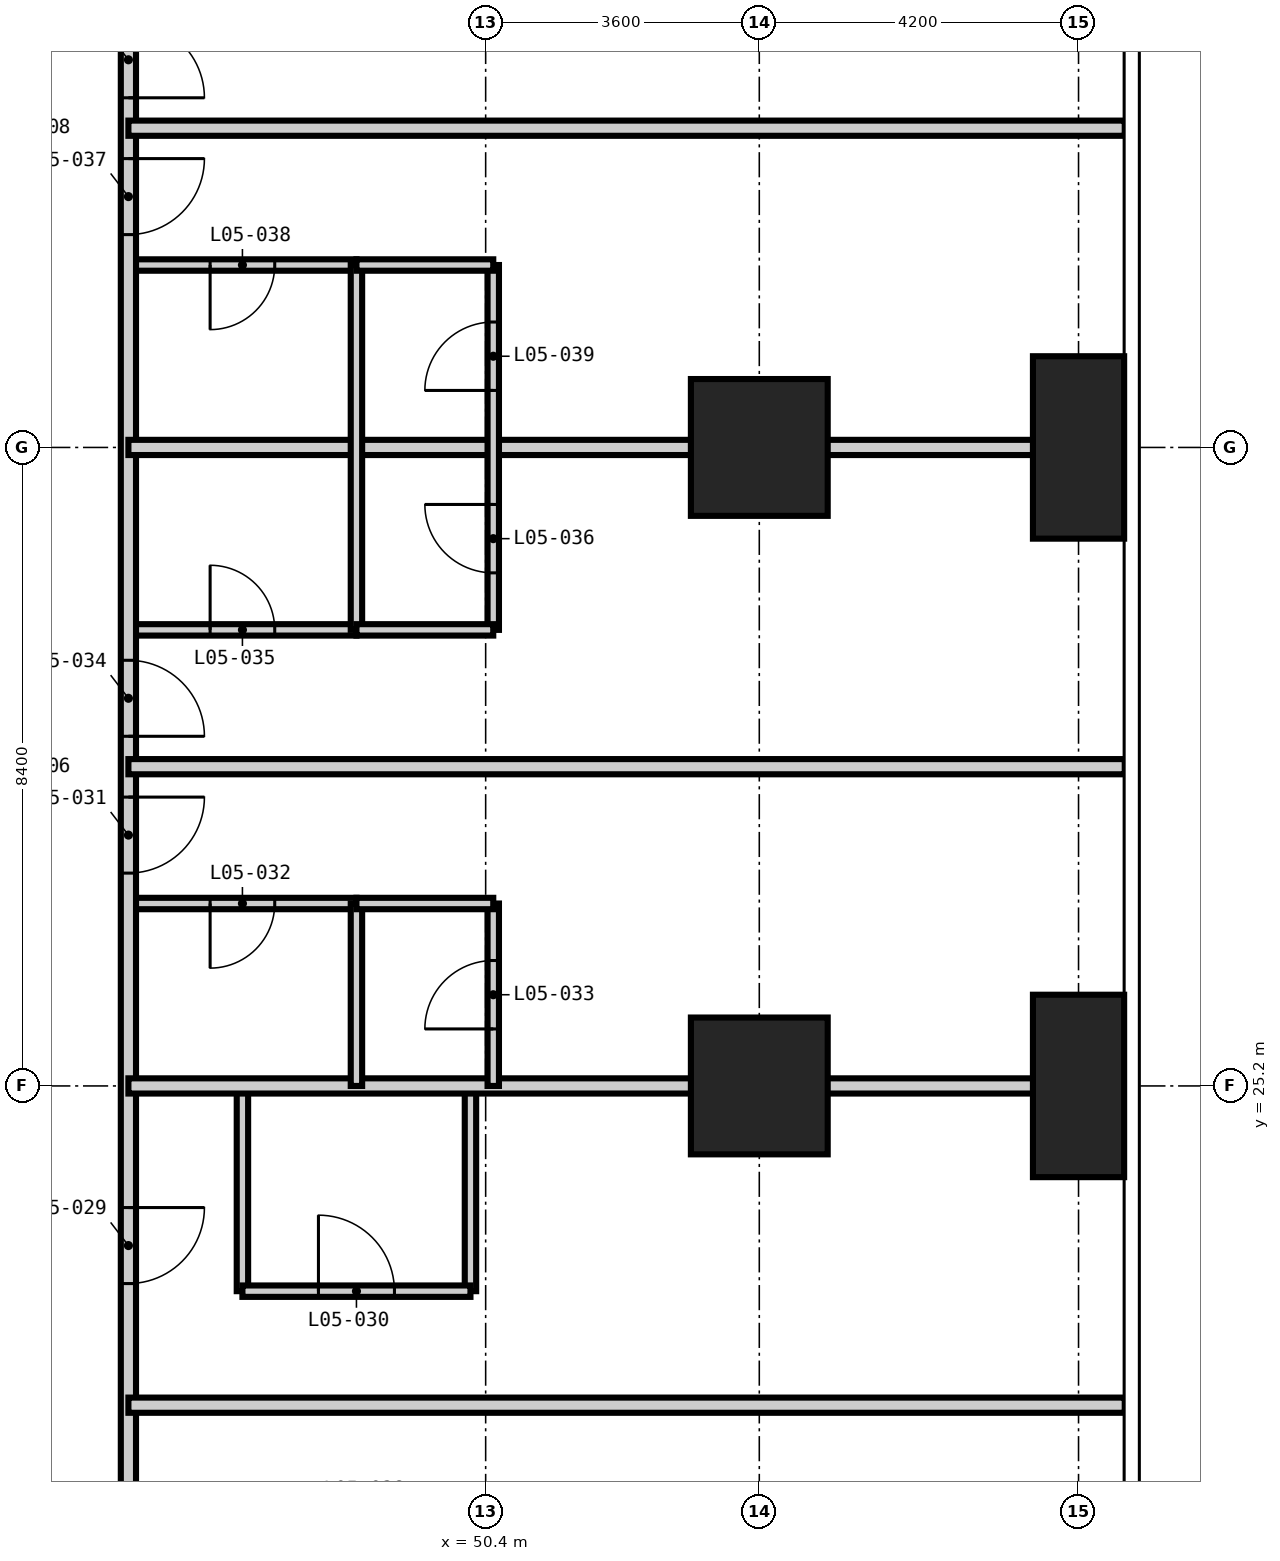
"""IFC4 building model, lengths in metres.
Left out: names, types, materials, properties, quantities, classifications, styles, units other than length and angle.
Written with IfcOpenShell. Run it as: python <this file> out.ifc"""

import sys

from ifc_helpers import new_model, si_unit, direction, frame, frame_2d, origin, origin_2d, place, context, subcontext, project, spatial, rectangle, extrude, element, fill, save


model = new_model("IFC4")
c1 = context("Model", 3, precision=1e-05, world=origin(), true_north=direction((0.0, 1.0)))
c2 = subcontext(c1, "Body", "Model", "MODEL_VIEW")
j1 = project(units=[si_unit("LENGTHUNIT", "METRE"), si_unit("PLANEANGLEUNIT", "RADIAN")], contexts=[c1])
p1 = place(None, origin())
s1 = spatial("IfcSite", under=j1, at=p1, CompositionType="ELEMENT")
p2 = place(p1, origin())
s2 = spatial("IfcBuilding", under=s1, at=p2, CompositionType="ELEMENT")
p3 = place(p2, frame((0.0, 0.0, 27.0)))
s3 = spatial("IfcBuildingStorey", under=s2, at=p3, CompositionType="ELEMENT", Elevation=27.0)
for number, where, z_axis, x_axis in (
    (1, (54.0, 25.2, -0.35), (0.0, 0.0, 1.0), (1.0, 0.0, 0.0)),
    (2, (54.0, 33.6, -0.35), (0.0, 0.0, 1.0), (1.0, 0.0, 0.0)),
):
    element("IfcColumn", number, at=place(p3, frame(where, z_axis=z_axis, x_axis=x_axis)), inside=s3, PredefinedType="COLUMN", context=c2, shape_type="SweptSolid", body=[
        extrude(rectangle(XDim=1.8, YDim=1.8, at=origin_2d()), origin(), (0.0, 0.0, 1.0), 3.6),
    ])
for number, where, z_axis, x_axis in (
    (3, (58.2, 25.2, -0.35), (0.0, 0.0, 1.0), (1.0, 0.0, 0.0)),
    (4, (58.2, 33.6, -0.35), (0.0, 0.0, 1.0), (1.0, 0.0, 0.0)),
):
    element("IfcColumn", number, at=place(p3, frame(where, z_axis=z_axis, x_axis=x_axis)), inside=s3, PredefinedType="COLUMN", context=c2, shape_type="SweptSolid", body=[
        extrude(rectangle(XDim=1.2, YDim=2.4, at=origin_2d()), origin(), (0.0, 0.0, 1.0), 3.6),
    ])
for number, where, z_axis, x_axis in (
    (5, (47.2, 22.5, 0.0), (0.0, 0.0, 1.0), (0.0, 1.0, 0.0)),
    (6, (50.2, 22.5, 0.0), (0.0, 0.0, 1.0), (0.0, 1.0, 0.0)),
):
    element("IfcWall", number, at=place(p3, frame(where, z_axis=z_axis, x_axis=x_axis)), inside=s3, PredefinedType="PARTITIONING", context=c2, shape_type="SweptSolid", body=[
        extrude(rectangle(XDim=2.7, YDim=0.15, at=frame_2d((1.35, 0.0))), origin(), (0.0, 0.0, 1.0), 3.25),
    ])
p4 = place(p3, frame((47.2, 22.5, 0.0), z_axis=(0.0, 0.0, 1.0), x_axis=(1.0, 0.0, 0.0)))
e7 = element("IfcWall", 7, at=p4, inside=s3, PredefinedType="PARTITIONING", context=c2, shape_type="SweptSolid", body=[
    extrude(rectangle(XDim=3.0, YDim=0.15, at=frame_2d((1.5, 0.0))), origin(), (0.0, 0.0, 1.0), 3.25),
])
p5 = place(p4, frame((1.0, 0.0, 0.0)))
e8 = element("IfcOpeningElement", 8, at=p5, cuts=e7, PredefinedType="OPENING", context=c2, shape_type="SweptSolid", body=[
    extrude(rectangle(XDim=1.0, YDim=2.1, at=frame_2d((0.5, 1.05))), frame((0.0, 0.085, 0.0), z_axis=(0.0, -1.0, 0.0), x_axis=(1.0, 0.0, 0.0)), (0.0, 0.0, 1.0), 0.17),
])
p6 = place(p3, frame((45.7, 27.6, 0.0), z_axis=(0.0, 0.0, 1.0), x_axis=(1.0, 0.0, 0.0)))
e9 = element("IfcWall", 9, at=p6, inside=s3, PredefinedType="PARTITIONING", context=c2, shape_type="SweptSolid", body=[
    extrude(rectangle(XDim=3.0, YDim=0.15, at=frame_2d((1.5, 0.0))), origin(), (0.0, 0.0, 1.0), 3.25),
])
p7 = place(p6, frame((1.075, 0.0, 0.0)))
e10 = element("IfcOpeningElement", 10, at=p7, cuts=e9, PredefinedType="OPENING", context=c2, shape_type="SweptSolid", body=[
    extrude(rectangle(XDim=0.85, YDim=2.1, at=frame_2d((0.425, 1.05))), frame((0.0, 0.085, 0.0), z_axis=(0.0, -1.0, 0.0), x_axis=(1.0, 0.0, 0.0)), (0.0, 0.0, 1.0), 0.17),
])
p8 = place(p3, frame((45.7, 31.2, 0.0), z_axis=(0.0, 0.0, 1.0), x_axis=(1.0, 0.0, 0.0)))
e11 = element("IfcWall", 11, at=p8, inside=s3, PredefinedType="PARTITIONING", context=c2, shape_type="SweptSolid", body=[
    extrude(rectangle(XDim=3.0, YDim=0.15, at=frame_2d((1.5, 0.0))), origin(), (0.0, 0.0, 1.0), 3.25),
])
p9 = place(p8, frame((1.075, 0.0, 0.0)))
e12 = element("IfcOpeningElement", 12, at=p9, cuts=e11, PredefinedType="OPENING", context=c2, shape_type="SweptSolid", body=[
    extrude(rectangle(XDim=0.85, YDim=2.1, at=frame_2d((0.425, 1.05))), frame((0.0, 0.085, 0.0), z_axis=(0.0, -1.0, 0.0), x_axis=(1.0, 0.0, 0.0)), (0.0, 0.0, 1.0), 0.17),
])
p10 = place(p3, frame((45.7, 36.0, 0.0), z_axis=(0.0, 0.0, 1.0), x_axis=(1.0, 0.0, 0.0)))
e13 = element("IfcWall", 13, at=p10, inside=s3, PredefinedType="PARTITIONING", context=c2, shape_type="SweptSolid", body=[
    extrude(rectangle(XDim=3.0, YDim=0.15, at=frame_2d((1.5, 0.0))), origin(), (0.0, 0.0, 1.0), 3.25),
])
p11 = place(p10, frame((1.075, 0.0, 0.0)))
e14 = element("IfcOpeningElement", 14, at=p11, cuts=e13, PredefinedType="OPENING", context=c2, shape_type="SweptSolid", body=[
    extrude(rectangle(XDim=0.85, YDim=2.1, at=frame_2d((0.425, 1.05))), frame((0.0, 0.085, 0.0), z_axis=(0.0, -1.0, 0.0), x_axis=(1.0, 0.0, 0.0)), (0.0, 0.0, 1.0), 0.17),
])
p12 = place(p3, frame((45.7, 46.0, 0.0), z_axis=(0.0, 0.0, 1.0), x_axis=(0.0, -1.0, 0.0)))
e15 = element("IfcWall", 15, at=p12, inside=s3, PredefinedType="PARTITIONING", context=c2, shape_type="SweptSolid", body=[
    extrude(rectangle(XDim=32.6, YDim=0.2, at=frame_2d((16.3, 0.0))), origin(), (0.0, 0.0, 1.0), 3.25),
])
p13 = place(p12, frame((26.6, 0.0, 0.0)))
e16 = element("IfcOpeningElement", 16, at=p13, cuts=e15, PredefinedType="OPENING", context=c2, shape_type="SweptSolid", body=[
    extrude(rectangle(XDim=1.0, YDim=2.2, at=frame_2d((0.5, 1.1))), frame((0.0, 0.11, 0.0), z_axis=(0.0, -1.0, 0.0), x_axis=(1.0, 0.0, 0.0)), (0.0, 0.0, 1.0), 0.22),
])
p14 = place(p12, frame((22.4, 0.0, 0.0)))
e17 = element("IfcOpeningElement", 17, at=p14, cuts=e15, PredefinedType="OPENING", context=c2, shape_type="SweptSolid", body=[
    extrude(rectangle(XDim=1.0, YDim=2.2, at=frame_2d((0.5, 1.1))), frame((0.0, 0.11, 0.0), z_axis=(0.0, -1.0, 0.0), x_axis=(1.0, 0.0, 0.0)), (0.0, 0.0, 1.0), 0.22),
])
p15 = place(p12, frame((17.0, 0.0, 0.0)))
e18 = element("IfcOpeningElement", 18, at=p15, cuts=e15, PredefinedType="OPENING", context=c2, shape_type="SweptSolid", body=[
    extrude(rectangle(XDim=1.0, YDim=2.2, at=frame_2d((0.5, 1.1))), frame((0.0, 0.11, 0.0), z_axis=(0.0, -1.0, 0.0), x_axis=(1.0, 0.0, 0.0)), (0.0, 0.0, 1.0), 0.22),
])
p16 = place(p12, frame((15.2, 0.0, 0.0)))
e19 = element("IfcOpeningElement", 19, at=p16, cuts=e15, PredefinedType="OPENING", context=c2, shape_type="SweptSolid", body=[
    extrude(rectangle(XDim=1.0, YDim=2.2, at=frame_2d((0.5, 1.1))), frame((0.0, 0.11, 0.0), z_axis=(0.0, -1.0, 0.0), x_axis=(1.0, 0.0, 0.0)), (0.0, 0.0, 1.0), 0.22),
])
p17 = place(p12, frame((8.6, 0.0, 0.0)))
e20 = element("IfcOpeningElement", 20, at=p17, cuts=e15, PredefinedType="OPENING", context=c2, shape_type="SweptSolid", body=[
    extrude(rectangle(XDim=1.0, YDim=2.2, at=frame_2d((0.5, 1.1))), frame((0.0, 0.11, 0.0), z_axis=(0.0, -1.0, 0.0), x_axis=(1.0, 0.0, 0.0)), (0.0, 0.0, 1.0), 0.22),
])
p18 = place(p12, frame((6.8, 0.0, 0.0)))
e21 = element("IfcOpeningElement", 21, at=p18, cuts=e15, PredefinedType="OPENING", context=c2, shape_type="SweptSolid", body=[
    extrude(rectangle(XDim=1.0, YDim=2.2, at=frame_2d((0.5, 1.1))), frame((0.0, 0.11, 0.0), z_axis=(0.0, -1.0, 0.0), x_axis=(1.0, 0.0, 0.0)), (0.0, 0.0, 1.0), 0.22),
])
p19 = place(p12, frame((30.4, 0.0, 0.0)))
e22 = element("IfcOpeningElement", 22, at=p19, cuts=e15, PredefinedType="OPENING", context=c2, shape_type="SweptSolid", body=[
    extrude(rectangle(XDim=1.0, YDim=2.2, at=frame_2d((0.5, 1.1))), frame((0.0, 0.11, 0.0), z_axis=(0.0, -1.0, 0.0), x_axis=(1.0, 0.0, 0.0)), (0.0, 0.0, 1.0), 0.22),
])
p20 = place(p12, frame((1.5, 0.0, 0.0)))
e23 = element("IfcOpeningElement", 23, at=p20, cuts=e15, PredefinedType="OPENING", context=c2, shape_type="SweptSolid", body=[
    extrude(rectangle(XDim=1.0, YDim=2.2, at=frame_2d((0.5, 1.1))), frame((0.0, 0.11, 0.0), z_axis=(0.0, -1.0, 0.0), x_axis=(1.0, 0.0, 0.0)), (0.0, 0.0, 1.0), 0.22),
])
for number, where, z_axis, x_axis in (
    (24, (45.7, 21.0, 0.0), (0.0, 0.0, 1.0), (1.0, 0.0, 0.0)),
    (25, (45.7, 25.2, 0.0), (0.0, 0.0, 1.0), (1.0, 0.0, 0.0)),
    (26, (45.7, 29.4, 0.0), (0.0, 0.0, 1.0), (1.0, 0.0, 0.0)),
    (27, (45.7, 33.6, 0.0), (0.0, 0.0, 1.0), (1.0, 0.0, 0.0)),
    (28, (45.7, 37.8, 0.0), (0.0, 0.0, 1.0), (1.0, 0.0, 0.0)),
):
    element("IfcWall", number, at=place(p3, frame(where, z_axis=z_axis, x_axis=x_axis)), inside=s3, PredefinedType="PARTITIONING", context=c2, shape_type="SweptSolid", body=[
        extrude(rectangle(XDim=13.108, YDim=0.2, at=frame_2d((6.554, 0.0))), origin(), (0.0, 0.0, 1.0), 3.25),
    ])
p21 = place(p3, frame((48.7, 25.2, 0.0), z_axis=(0.0, 0.0, 1.0), x_axis=(0.0, 1.0, 0.0)))
e29 = element("IfcWall", 29, at=p21, inside=s3, PredefinedType="PARTITIONING", context=c2, shape_type="SweptSolid", body=[
    extrude(rectangle(XDim=2.4, YDim=0.15, at=frame_2d((1.2, 0.0))), origin(), (0.0, 0.0, 1.0), 3.25),
])
p22 = place(p3, frame((48.7, 31.2, 0.0), z_axis=(0.0, 0.0, 1.0), x_axis=(0.0, 1.0, 0.0)))
e30 = element("IfcWall", 30, at=p22, inside=s3, PredefinedType="PARTITIONING", context=c2, shape_type="SweptSolid", body=[
    extrude(rectangle(XDim=4.8, YDim=0.15, at=frame_2d((2.4, 0.0))), origin(), (0.0, 0.0, 1.0), 3.25),
])
p23 = place(p3, frame((50.5, 25.2, 0.0), z_axis=(0.0, 0.0, 1.0), x_axis=(0.0, 1.0, 0.0)))
e31 = element("IfcWall", 31, at=p23, inside=s3, PredefinedType="PARTITIONING", context=c2, shape_type="SweptSolid", body=[
    extrude(rectangle(XDim=2.4, YDim=0.15, at=frame_2d((1.2, 0.0))), origin(), (0.0, 0.0, 1.0), 3.25),
])
p24 = place(p23, frame((0.75, 0.0, 0.0)))
e32 = element("IfcOpeningElement", 32, at=p24, cuts=e31, PredefinedType="OPENING", context=c2, shape_type="SweptSolid", body=[
    extrude(rectangle(XDim=0.9, YDim=2.1, at=frame_2d((0.45, 1.05))), frame((0.0, 0.085, 0.0), z_axis=(0.0, -1.0, 0.0), x_axis=(1.0, 0.0, 0.0)), (0.0, 0.0, 1.0), 0.17),
])
p25 = place(p3, frame((50.5, 31.2, 0.0), z_axis=(0.0, 0.0, 1.0), x_axis=(0.0, 1.0, 0.0)))
e33 = element("IfcWall", 33, at=p25, inside=s3, PredefinedType="PARTITIONING", context=c2, shape_type="SweptSolid", body=[
    extrude(rectangle(XDim=4.8, YDim=0.15, at=frame_2d((2.4, 0.0))), origin(), (0.0, 0.0, 1.0), 3.25),
])
p26 = place(p25, frame((0.75, 0.0, 0.0)))
e34 = element("IfcOpeningElement", 34, at=p26, cuts=e33, PredefinedType="OPENING", context=c2, shape_type="SweptSolid", body=[
    extrude(rectangle(XDim=0.9, YDim=2.1, at=frame_2d((0.45, 1.05))), frame((0.0, 0.085, 0.0), z_axis=(0.0, -1.0, 0.0), x_axis=(1.0, 0.0, 0.0)), (0.0, 0.0, 1.0), 0.17),
])
p27 = place(p25, frame((3.15, 0.0, 0.0)))
e35 = element("IfcOpeningElement", 35, at=p27, cuts=e33, PredefinedType="OPENING", context=c2, shape_type="SweptSolid", body=[
    extrude(rectangle(XDim=0.9, YDim=2.1, at=frame_2d((0.45, 1.05))), frame((0.0, 0.085, 0.0), z_axis=(0.0, -1.0, 0.0), x_axis=(1.0, 0.0, 0.0)), (0.0, 0.0, 1.0), 0.17),
])
for number, where, z_axis, x_axis in (
    (36, (48.7, 27.6, 0.0), (0.0, 0.0, 1.0), (1.0, 0.0, 0.0)),
    (37, (48.7, 31.2, 0.0), (0.0, 0.0, 1.0), (1.0, 0.0, 0.0)),
    (38, (48.7, 36.0, 0.0), (0.0, 0.0, 1.0), (1.0, 0.0, 0.0)),
):
    element("IfcWall", number, at=place(p3, frame(where, z_axis=z_axis, x_axis=x_axis)), inside=s3, PredefinedType="PARTITIONING", context=c2, shape_type="SweptSolid", body=[
        extrude(rectangle(XDim=1.8, YDim=0.15, at=frame_2d((0.9, 0.0))), origin(), (0.0, 0.0, 1.0), 3.25),
    ])
p28 = place(p14, origin())
e39 = element("IfcDoor", 39, at=p28, inside=s3, OperationType="SINGLE_SWING_LEFT", PredefinedType="DOOR", context=c2, shape_type="SweptSolid", body=[
    extrude(rectangle(XDim=1.0, YDim=2.2, at=frame_2d((0.5, 1.1))), frame((0.0, 0.025, 0.0), z_axis=(0.0, -1.0, 0.0), x_axis=(1.0, 0.0, 0.0)), (0.0, 0.0, 1.0), 0.05),
])
fill(e17, e39)
p29 = place(p5, origin())
e40 = element("IfcDoor", 40, at=p29, inside=s3, OperationType="SINGLE_SWING_LEFT", PredefinedType="DOOR", context=c2, shape_type="SweptSolid", body=[
    extrude(rectangle(XDim=1.0, YDim=2.1, at=frame_2d((0.5, 1.05))), frame((0.0, 0.025, 0.0), z_axis=(0.0, -1.0, 0.0), x_axis=(1.0, 0.0, 0.0)), (0.0, 0.0, 1.0), 0.05),
])
fill(e8, e40)
p30 = place(p15, origin())
e41 = element("IfcDoor", 41, at=p30, inside=s3, OperationType="SINGLE_SWING_LEFT", PredefinedType="DOOR", context=c2, shape_type="SweptSolid", body=[
    extrude(rectangle(XDim=1.0, YDim=2.2, at=frame_2d((0.5, 1.1))), frame((0.0, 0.025, 0.0), z_axis=(0.0, -1.0, 0.0), x_axis=(1.0, 0.0, 0.0)), (0.0, 0.0, 1.0), 0.05),
])
fill(e18, e41)
p31 = place(p7, frame((0.85, 0.0, 0.0), z_axis=(0.0, 0.0, 1.0), x_axis=(-1.0, 0.0, 0.0)))
e42 = element("IfcDoor", 42, at=p31, inside=s3, OperationType="SINGLE_SWING_RIGHT", PredefinedType="DOOR", context=c2, shape_type="SweptSolid", body=[
    extrude(rectangle(XDim=0.85, YDim=2.1, at=frame_2d((0.425, 1.05))), frame((0.0, 0.025, 0.0), z_axis=(0.0, -1.0, 0.0), x_axis=(1.0, 0.0, 0.0)), (0.0, 0.0, 1.0), 0.05),
])
fill(e10, e42)
p32 = place(p24, origin())
e43 = element("IfcDoor", 43, at=p32, inside=s3, OperationType="SINGLE_SWING_LEFT", PredefinedType="DOOR", context=c2, shape_type="SweptSolid", body=[
    extrude(rectangle(XDim=0.9, YDim=2.1, at=frame_2d((0.45, 1.05))), frame((0.0, 0.025, 0.0), z_axis=(0.0, -1.0, 0.0), x_axis=(1.0, 0.0, 0.0)), (0.0, 0.0, 1.0), 0.05),
])
fill(e32, e43)
p33 = place(p16, origin())
e44 = element("IfcDoor", 44, at=p33, inside=s3, OperationType="SINGLE_SWING_RIGHT", PredefinedType="DOOR", context=c2, shape_type="SweptSolid", body=[
    extrude(rectangle(XDim=1.0, YDim=2.2, at=frame_2d((0.5, 1.1))), frame((0.0, 0.025, 0.0), z_axis=(0.0, -1.0, 0.0), x_axis=(1.0, 0.0, 0.0)), (0.0, 0.0, 1.0), 0.05),
])
fill(e19, e44)
p34 = place(p9, origin())
e45 = element("IfcDoor", 45, at=p34, inside=s3, OperationType="SINGLE_SWING_LEFT", PredefinedType="DOOR", context=c2, shape_type="SweptSolid", body=[
    extrude(rectangle(XDim=0.85, YDim=2.1, at=frame_2d((0.425, 1.05))), frame((0.0, 0.025, 0.0), z_axis=(0.0, -1.0, 0.0), x_axis=(1.0, 0.0, 0.0)), (0.0, 0.0, 1.0), 0.05),
])
fill(e12, e45)
p35 = place(p26, origin())
e46 = element("IfcDoor", 46, at=p35, inside=s3, OperationType="SINGLE_SWING_RIGHT", PredefinedType="DOOR", context=c2, shape_type="SweptSolid", body=[
    extrude(rectangle(XDim=0.9, YDim=2.1, at=frame_2d((0.45, 1.05))), frame((0.0, 0.025, 0.0), z_axis=(0.0, -1.0, 0.0), x_axis=(1.0, 0.0, 0.0)), (0.0, 0.0, 1.0), 0.05),
])
fill(e34, e46)
p36 = place(p17, origin())
e47 = element("IfcDoor", 47, at=p36, inside=s3, OperationType="SINGLE_SWING_LEFT", PredefinedType="DOOR", context=c2, shape_type="SweptSolid", body=[
    extrude(rectangle(XDim=1.0, YDim=2.2, at=frame_2d((0.5, 1.1))), frame((0.0, 0.025, 0.0), z_axis=(0.0, -1.0, 0.0), x_axis=(1.0, 0.0, 0.0)), (0.0, 0.0, 1.0), 0.05),
])
fill(e20, e47)
p37 = place(p11, frame((0.85, 0.0, 0.0), z_axis=(0.0, 0.0, 1.0), x_axis=(-1.0, 0.0, 0.0)))
e48 = element("IfcDoor", 48, at=p37, inside=s3, OperationType="SINGLE_SWING_RIGHT", PredefinedType="DOOR", context=c2, shape_type="SweptSolid", body=[
    extrude(rectangle(XDim=0.85, YDim=2.1, at=frame_2d((0.425, 1.05))), frame((0.0, 0.025, 0.0), z_axis=(0.0, -1.0, 0.0), x_axis=(1.0, 0.0, 0.0)), (0.0, 0.0, 1.0), 0.05),
])
fill(e14, e48)
p38 = place(p27, origin())
e49 = element("IfcDoor", 49, at=p38, inside=s3, OperationType="SINGLE_SWING_LEFT", PredefinedType="DOOR", context=c2, shape_type="SweptSolid", body=[
    extrude(rectangle(XDim=0.9, YDim=2.1, at=frame_2d((0.45, 1.05))), frame((0.0, 0.025, 0.0), z_axis=(0.0, -1.0, 0.0), x_axis=(1.0, 0.0, 0.0)), (0.0, 0.0, 1.0), 0.05),
])
fill(e35, e49)
p39 = place(p18, origin())
e50 = element("IfcDoor", 50, at=p39, inside=s3, OperationType="SINGLE_SWING_RIGHT", PredefinedType="DOOR", context=c2, shape_type="SweptSolid", body=[
    extrude(rectangle(XDim=1.0, YDim=2.2, at=frame_2d((0.5, 1.1))), frame((0.0, 0.025, 0.0), z_axis=(0.0, -1.0, 0.0), x_axis=(1.0, 0.0, 0.0)), (0.0, 0.0, 1.0), 0.05),
])
fill(e21, e50)
save(model, sys.argv[1])
